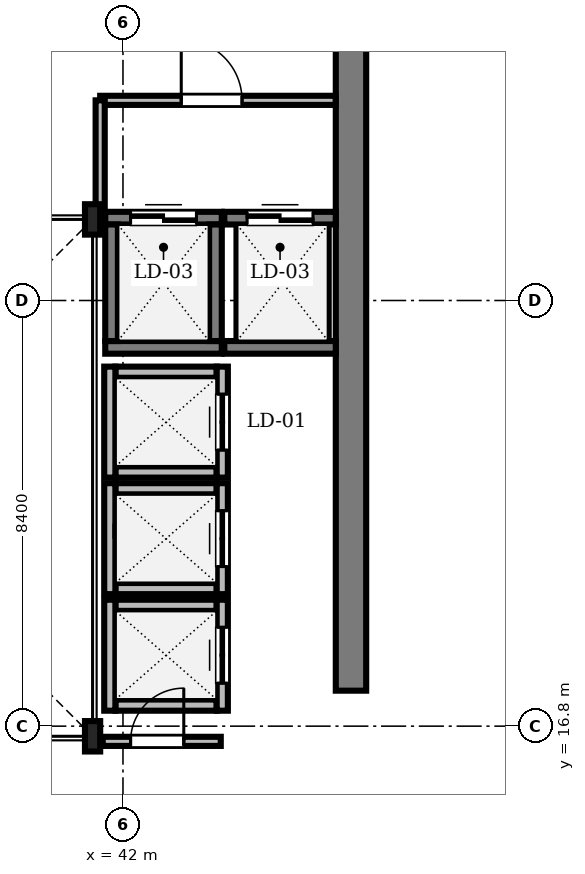
"""IFC4 building model, lengths in metres.
Left out: names, types, materials, properties, quantities, classifications, styles, units other than length and angle.
Written with IfcOpenShell. Run it as: python <this file> out.ifc"""

import sys

from ifc_helpers import new_model, si_unit, direction, frame, frame_2d, origin, origin_2d, place, context, subcontext, project, spatial, rectangle, i_section, extrude, source, transform, mapped, element, fill, save


model = new_model("IFC4")
c1 = context("Model", 3, precision=1e-05, world=origin(), true_north=direction((0.0, 1.0)))
c2 = subcontext(c1, "Body", "Model", "MODEL_VIEW")
j1 = project(units=[si_unit("LENGTHUNIT", "METRE"), si_unit("PLANEANGLEUNIT", "RADIAN")], contexts=[c1])
p1 = place(None, origin())
s1 = spatial("IfcSite", under=j1, at=p1, CompositionType="ELEMENT")
p2 = place(p1, origin())
s2 = spatial("IfcBuilding", under=s1, at=p2, CompositionType="ELEMENT")
p3 = place(p2, frame((0.0, 0.0, 250.6)))
s3 = spatial("IfcBuildingStorey", under=s2, at=p3, CompositionType="ELEMENT", Elevation=250.6)
m1 = source(origin(), c2, "Body", "SweptSolid", [
    extrude(rectangle(XDim=13.15, YDim=0.6, at=frame_2d((6.575, 0.0))), origin(), (0.0, 0.0, 1.0), 3.65),
])
p4 = place(p3, frame((46.5, 17.5, 0.0), z_axis=(0.0, 0.0, 1.0), x_axis=(0.0, 1.0, 0.0)))
e1 = element("IfcWall", 1, at=p4, inside=s3, PredefinedType="SHEAR", context=c2, shape_type="MappedRepresentation", body=[
    mapped(m1, transform((0.0, 0.0, 0.0), scale=1.0)),
])
m2 = source(origin(), c2, "Body", "SweptSolid", [
    extrude(i_section(OverallWidth=0.3, OverallDepth=0.6, WebThickness=0.015, FlangeThickness=0.03, FilletRadius=0.027, at=origin_2d()), origin(), (0.0, 0.0, 1.0), 3.65),
])
for number, where, z_axis, x_axis in (
    (2, (41.4, 16.6, 0.0), (0.0, 0.0, 1.0), (1.0, 0.0, 0.0)),
    (3, (41.4, 26.8, 0.0), (0.0, 0.0, 1.0), (1.0, 0.0, 0.0)),
):
    element("IfcColumn", number, at=place(p3, frame(where, z_axis=z_axis, x_axis=x_axis)), inside=s3, PredefinedType="COLUMN", context=c2, shape_type="MappedRepresentation", body=[
        mapped(m2, transform((0.0, 0.0, 0.0), scale=1.0)),
    ])
m3 = source(origin(), c2, "Body", "SweptSolid", [
    extrude(rectangle(XDim=2.0, YDim=0.22, at=frame_2d((1.0, 0.0))), origin(), (0.0, 0.0, 1.0), 3.65),
])
for number, where, z_axis, x_axis in (
    (4, (41.85, 21.815, 0.0), (0.0, 0.0, 1.0), (1.0, 0.0, 0.0)),
    (5, (41.85, 23.785, 0.0), (0.0, 0.0, 1.0), (1.0, 0.0, 0.0)),
):
    element("IfcWall", number, at=place(p3, frame(where, z_axis=z_axis, x_axis=x_axis)), inside=s3, PredefinedType="SOLIDWALL", context=c2, shape_type="MappedRepresentation", body=[
        mapped(m3, transform((0.0, 0.0, 0.0), scale=1.0)),
    ])
m4 = source(origin(), c2, "Body", "SweptSolid", [
    extrude(rectangle(XDim=2.19, YDim=0.22, at=frame_2d((1.095, 0.0))), origin(), (0.0, 0.0, 1.0), 3.65),
])
p5 = place(p3, frame((41.74, 21.705, 0.0), z_axis=(0.0, 0.0, 1.0), x_axis=(0.0, 1.0, 0.0)))
e6 = element("IfcWall", 6, at=p5, inside=s3, PredefinedType="SOLIDWALL", context=c2, shape_type="MappedRepresentation", body=[
    mapped(m4, transform((0.0, 0.0, 0.0), scale=1.0)),
])
p6 = place(p3, frame((43.96, 21.705, 0.0), z_axis=(0.0, 0.0, 1.0), x_axis=(0.0, 1.0, 0.0)))
e7 = element("IfcWall", 7, at=p6, inside=s3, PredefinedType="SOLIDWALL", context=c2, shape_type="MappedRepresentation", body=[
    mapped(m4, transform((0.0, 0.0, 0.0), scale=1.0)),
])
m5 = source(origin(), c2, "Body", "SweptSolid", [
    extrude(rectangle(XDim=1.1, YDim=2.2, at=frame_2d((0.55, 1.1))), frame((0.0, 0.12, 0.0), z_axis=(0.0, -1.0, 0.0), x_axis=(1.0, 0.0, 0.0)), (0.0, 0.0, 1.0), 0.24),
])
p7 = place(p6, frame((0.545, 0.0, 0.0)))
e8 = element("IfcOpeningElement", 8, at=p7, cuts=e7, PredefinedType="OPENING", context=c2, shape_type="MappedRepresentation", body=[
    mapped(m5, transform((0.0, 0.0, 0.0), scale=1.0)),
])
for number, where, z_axis, x_axis in (
    (9, (41.85, 19.515, 0.0), (0.0, 0.0, 1.0), (1.0, 0.0, 0.0)),
    (10, (41.85, 21.485, 0.0), (0.0, 0.0, 1.0), (1.0, 0.0, 0.0)),
):
    element("IfcWall", number, at=place(p3, frame(where, z_axis=z_axis, x_axis=x_axis)), inside=s3, PredefinedType="SOLIDWALL", context=c2, shape_type="MappedRepresentation", body=[
        mapped(m3, transform((0.0, 0.0, 0.0), scale=1.0)),
    ])
p8 = place(p3, frame((41.74, 19.405, 0.0), z_axis=(0.0, 0.0, 1.0), x_axis=(0.0, 1.0, 0.0)))
e11 = element("IfcWall", 11, at=p8, inside=s3, PredefinedType="SOLIDWALL", context=c2, shape_type="MappedRepresentation", body=[
    mapped(m4, transform((0.0, 0.0, 0.0), scale=1.0)),
])
p9 = place(p3, frame((43.96, 19.405, 0.0), z_axis=(0.0, 0.0, 1.0), x_axis=(0.0, 1.0, 0.0)))
e12 = element("IfcWall", 12, at=p9, inside=s3, PredefinedType="SOLIDWALL", context=c2, shape_type="MappedRepresentation", body=[
    mapped(m4, transform((0.0, 0.0, 0.0), scale=1.0)),
])
p10 = place(p9, frame((0.545, 0.0, 0.0)))
e13 = element("IfcOpeningElement", 13, at=p10, cuts=e12, PredefinedType="OPENING", context=c2, shape_type="MappedRepresentation", body=[
    mapped(m5, transform((0.0, 0.0, 0.0), scale=1.0)),
])
for number, where, z_axis, x_axis in (
    (14, (41.85, 17.215, 0.0), (0.0, 0.0, 1.0), (1.0, 0.0, 0.0)),
    (15, (41.85, 19.185, 0.0), (0.0, 0.0, 1.0), (1.0, 0.0, 0.0)),
):
    element("IfcWall", number, at=place(p3, frame(where, z_axis=z_axis, x_axis=x_axis)), inside=s3, PredefinedType="SOLIDWALL", context=c2, shape_type="MappedRepresentation", body=[
        mapped(m3, transform((0.0, 0.0, 0.0), scale=1.0)),
    ])
p11 = place(p3, frame((41.74, 17.105, 0.0), z_axis=(0.0, 0.0, 1.0), x_axis=(0.0, 1.0, 0.0)))
e16 = element("IfcWall", 16, at=p11, inside=s3, PredefinedType="SOLIDWALL", context=c2, shape_type="MappedRepresentation", body=[
    mapped(m4, transform((0.0, 0.0, 0.0), scale=1.0)),
])
p12 = place(p3, frame((43.96, 17.105, 0.0), z_axis=(0.0, 0.0, 1.0), x_axis=(0.0, 1.0, 0.0)))
e17 = element("IfcWall", 17, at=p12, inside=s3, PredefinedType="SOLIDWALL", context=c2, shape_type="MappedRepresentation", body=[
    mapped(m4, transform((0.0, 0.0, 0.0), scale=1.0)),
])
p13 = place(p12, frame((0.545, 0.0, 0.0)))
e18 = element("IfcOpeningElement", 18, at=p13, cuts=e17, PredefinedType="OPENING", context=c2, shape_type="MappedRepresentation", body=[
    mapped(m5, transform((0.0, 0.0, 0.0), scale=1.0)),
])
m6 = source(origin(), c2, "Body", "SweptSolid", [
    extrude(rectangle(XDim=2.3, YDim=0.25, at=frame_2d((1.15, 0.0))), origin(), (0.0, 0.0, 1.0), 3.65),
])
p14 = place(p3, frame((41.65, 24.275, 0.0), z_axis=(0.0, 0.0, 1.0), x_axis=(1.0, 0.0, 0.0)))
e19 = element("IfcWall", 19, at=p14, inside=s3, PredefinedType="SOLIDWALL", context=c2, shape_type="MappedRepresentation", body=[
    mapped(m6, transform((0.0, 0.0, 0.0), scale=1.0)),
])
p15 = place(p3, frame((41.65, 26.825, 0.0), z_axis=(0.0, 0.0, 1.0), x_axis=(1.0, 0.0, 0.0)))
e20 = element("IfcWall", 20, at=p15, inside=s3, PredefinedType="SOLIDWALL", context=c2, shape_type="MappedRepresentation", body=[
    mapped(m6, transform((0.0, 0.0, 0.0), scale=1.0)),
])
m7 = source(origin(), c2, "Body", "SweptSolid", [
    extrude(rectangle(XDim=1.3, YDim=2.3, at=frame_2d((0.65, 1.15))), frame((0.0, 0.135, 0.0), z_axis=(0.0, -1.0, 0.0), x_axis=(1.0, 0.0, 0.0)), (0.0, 0.0, 1.0), 0.27),
])
p16 = place(p15, frame((0.5, 0.0, 0.0)))
e21 = element("IfcOpeningElement", 21, at=p16, cuts=e20, PredefinedType="OPENING", context=c2, shape_type="MappedRepresentation", body=[
    mapped(m7, transform((0.0, 0.0, 0.0), scale=1.0)),
])
for number, where, z_axis, x_axis in (
    (22, (41.775, 24.4, 0.0), (0.0, 0.0, 1.0), (0.0, 1.0, 0.0)),
    (23, (43.825, 24.4, 0.0), (0.0, 0.0, 1.0), (0.0, 1.0, 0.0)),
):
    element("IfcWall", number, at=place(p3, frame(where, z_axis=z_axis, x_axis=x_axis)), inside=s3, PredefinedType="SOLIDWALL", context=c2, shape_type="MappedRepresentation", body=[
        mapped(m6, transform((0.0, 0.0, 0.0), scale=1.0)),
    ])
m8 = source(origin(), c2, "Body", "SweptSolid", [
    extrude(rectangle(XDim=2.2, YDim=0.25, at=frame_2d((1.1, 0.0))), origin(), (0.0, 0.0, 1.0), 3.65),
])
p17 = place(p3, frame((44.0, 24.275, 0.0), z_axis=(0.0, 0.0, 1.0), x_axis=(1.0, 0.0, 0.0)))
e24 = element("IfcWall", 24, at=p17, inside=s3, PredefinedType="SOLIDWALL", context=c2, shape_type="MappedRepresentation", body=[
    mapped(m8, transform((0.0, 0.0, 0.0), scale=1.0)),
])
p18 = place(p3, frame((44.0, 26.825, 0.0), z_axis=(0.0, 0.0, 1.0), x_axis=(1.0, 0.0, 0.0)))
e25 = element("IfcWall", 25, at=p18, inside=s3, PredefinedType="SOLIDWALL", context=c2, shape_type="MappedRepresentation", body=[
    mapped(m8, transform((0.0, 0.0, 0.0), scale=1.0)),
])
p19 = place(p18, frame((0.45, 0.0, 0.0)))
e26 = element("IfcOpeningElement", 26, at=p19, cuts=e25, PredefinedType="OPENING", context=c2, shape_type="MappedRepresentation", body=[
    mapped(m7, transform((0.0, 0.0, 0.0), scale=1.0)),
])
m9 = source(origin(), c2, "Body", "SweptSolid", [
    extrude(rectangle(XDim=4.648, YDim=0.18, at=frame_2d((2.324, 0.0))), origin(), (0.0, 0.0, 1.0), 3.282),
])
p20 = place(p3, frame((41.55, 29.15, 0.0), z_axis=(0.0, 0.0, 1.0), x_axis=(1.0, 0.0, 0.0)))
e27 = element("IfcWall", 27, at=p20, inside=s3, PredefinedType="PARTITIONING", context=c2, shape_type="MappedRepresentation", body=[
    mapped(m9, transform((0.0, 0.0, 0.0), scale=1.0)),
])
m10 = source(origin(), c2, "Body", "SweptSolid", [
    extrude(rectangle(XDim=1.2, YDim=2.2, at=frame_2d((0.6, 1.1))), frame((0.0, 0.1, 0.0), z_axis=(0.0, -1.0, 0.0), x_axis=(1.0, 0.0, 0.0)), (0.0, 0.0, 1.0), 0.2),
])
p21 = place(p20, frame((1.6, 0.0, 0.0)))
e28 = element("IfcOpeningElement", 28, at=p21, cuts=e27, PredefinedType="OPENING", context=c2, shape_type="MappedRepresentation", body=[
    mapped(m10, transform((0.0, 0.0, 0.0), scale=1.0)),
])
m11 = source(origin(), c2, "Body", "SweptSolid", [
    extrude(rectangle(XDim=2.33, YDim=0.18, at=frame_2d((1.165, 0.0))), origin(), (0.0, 0.0, 1.0), 3.092),
])
p22 = place(p3, frame((41.6, 16.5, 0.0), z_axis=(0.0, 0.0, 1.0), x_axis=(1.0, 0.0, 0.0)))
e29 = element("IfcWall", 29, at=p22, inside=s3, PredefinedType="PARTITIONING", context=c2, shape_type="MappedRepresentation", body=[
    mapped(m11, transform((0.0, 0.0, 0.0), scale=1.0)),
])
m12 = source(origin(), c2, "Body", "SweptSolid", [
    extrude(rectangle(XDim=1.05, YDim=2.2, at=frame_2d((0.525, 1.1))), frame((0.0, 0.1, 0.0), z_axis=(0.0, -1.0, 0.0), x_axis=(1.0, 0.0, 0.0)), (0.0, 0.0, 1.0), 0.2),
])
p23 = place(p22, frame((0.55, 0.0, 0.0)))
e30 = element("IfcOpeningElement", 30, at=p23, cuts=e29, PredefinedType="OPENING", context=c2, shape_type="MappedRepresentation", body=[
    mapped(m12, transform((0.0, 0.0, 0.0), scale=1.0)),
])
m13 = source(origin(), c2, "Body", "SweptSolid", [
    extrude(rectangle(XDim=2.35, YDim=0.18, at=frame_2d((1.175, 0.0))), origin(), (0.0, 0.0, 1.0), 3.282),
])
p24 = place(p3, frame((41.55, 26.8, 0.0), z_axis=(0.0, 0.0, 1.0), x_axis=(0.0, 1.0, 0.0)))
e31 = element("IfcWall", 31, at=p24, inside=s3, PredefinedType="PARTITIONING", context=c2, shape_type="MappedRepresentation", body=[
    mapped(m13, transform((0.0, 0.0, 0.0), scale=1.0)),
])
m14 = source(origin(), c2, "Body", "SweptSolid", [
    extrude(rectangle(XDim=1.858, YDim=0.18, at=frame_2d((0.929, 0.0))), origin(), (0.0, 0.0, 1.0), 3.65),
])
p25 = place(p3, frame((41.852, 20.65, 0.0), z_axis=(0.0, 0.0, 1.0), x_axis=(1.0, 0.0, 0.0)))
e32 = element("IfcWall", 32, at=p25, inside=s3, PredefinedType="PARTITIONING", context=c2, shape_type="MappedRepresentation", body=[
    mapped(m14, transform((0.0, 0.0, 0.0), scale=1.0)),
])
m15 = source(origin(), c2, "Body", "SweptSolid", [
    extrude(rectangle(XDim=1.1, YDim=2.2, at=frame_2d((0.55, 1.1))), frame((0.0, 0.025, 0.0), z_axis=(0.0, -1.0, 0.0), x_axis=(1.0, 0.0, 0.0)), (0.0, 0.0, 1.0), 0.05),
])
p26 = place(p7, origin())
e33 = element("IfcDoor", 33, at=p26, inside=s3, OperationType="DOUBLE_DOOR_SLIDING", PredefinedType="DOOR", context=c2, shape_type="MappedRepresentation", body=[
    mapped(m15, transform((0.0, 0.0, 0.0), scale=1.0)),
])
fill(e8, e33)
p27 = place(p10, origin())
e34 = element("IfcDoor", 34, at=p27, inside=s3, OperationType="DOUBLE_DOOR_SLIDING", PredefinedType="DOOR", context=c2, shape_type="MappedRepresentation", body=[
    mapped(m15, transform((0.0, 0.0, 0.0), scale=1.0)),
])
fill(e13, e34)
p28 = place(p13, origin())
e35 = element("IfcDoor", 35, at=p28, inside=s3, OperationType="DOUBLE_DOOR_SLIDING", PredefinedType="DOOR", context=c2, shape_type="MappedRepresentation", body=[
    mapped(m15, transform((0.0, 0.0, 0.0), scale=1.0)),
])
fill(e18, e35)
m16 = source(origin(), c2, "Body", "SweptSolid", [
    extrude(rectangle(XDim=1.3, YDim=2.3, at=frame_2d((0.65, 1.15))), frame((0.0, 0.025, 0.0), z_axis=(0.0, -1.0, 0.0), x_axis=(1.0, 0.0, 0.0)), (0.0, 0.0, 1.0), 0.05),
])
p29 = place(p16, origin())
e36 = element("IfcDoor", 36, at=p29, inside=s3, OperationType="DOUBLE_DOOR_SLIDING", PredefinedType="DOOR", context=c2, shape_type="MappedRepresentation", body=[
    mapped(m16, transform((0.0, 0.0, 0.0), scale=1.0)),
])
fill(e21, e36)
p30 = place(p19, origin())
e37 = element("IfcDoor", 37, at=p30, inside=s3, OperationType="DOUBLE_DOOR_SLIDING", PredefinedType="DOOR", context=c2, shape_type="MappedRepresentation", body=[
    mapped(m16, transform((0.0, 0.0, 0.0), scale=1.0)),
])
fill(e26, e37)
m17 = source(origin(), c2, "Body", "SweptSolid", [
    extrude(rectangle(XDim=1.2, YDim=2.2, at=frame_2d((0.6, 1.1))), frame((0.0, 0.025, 0.0), z_axis=(0.0, -1.0, 0.0), x_axis=(1.0, 0.0, 0.0)), (0.0, 0.0, 1.0), 0.05),
])
p31 = place(p21, origin())
e38 = element("IfcDoor", 38, at=p31, inside=s3, OperationType="SINGLE_SWING_LEFT", PredefinedType="DOOR", context=c2, shape_type="MappedRepresentation", body=[
    mapped(m17, transform((0.0, 0.0, 0.0), scale=1.0)),
])
fill(e28, e38)
m18 = source(origin(), c2, "Body", "SweptSolid", [
    extrude(rectangle(XDim=1.05, YDim=2.2, at=frame_2d((0.525, 1.1))), frame((0.0, 0.025, 0.0), z_axis=(0.0, -1.0, 0.0), x_axis=(1.0, 0.0, 0.0)), (0.0, 0.0, 1.0), 0.05),
])
p32 = place(p23, origin())
e39 = element("IfcDoor", 39, at=p32, inside=s3, OperationType="SINGLE_SWING_RIGHT", PredefinedType="DOOR", context=c2, shape_type="MappedRepresentation", body=[
    mapped(m18, transform((0.0, 0.0, 0.0), scale=1.0)),
])
fill(e30, e39)
save(model, sys.argv[1])
